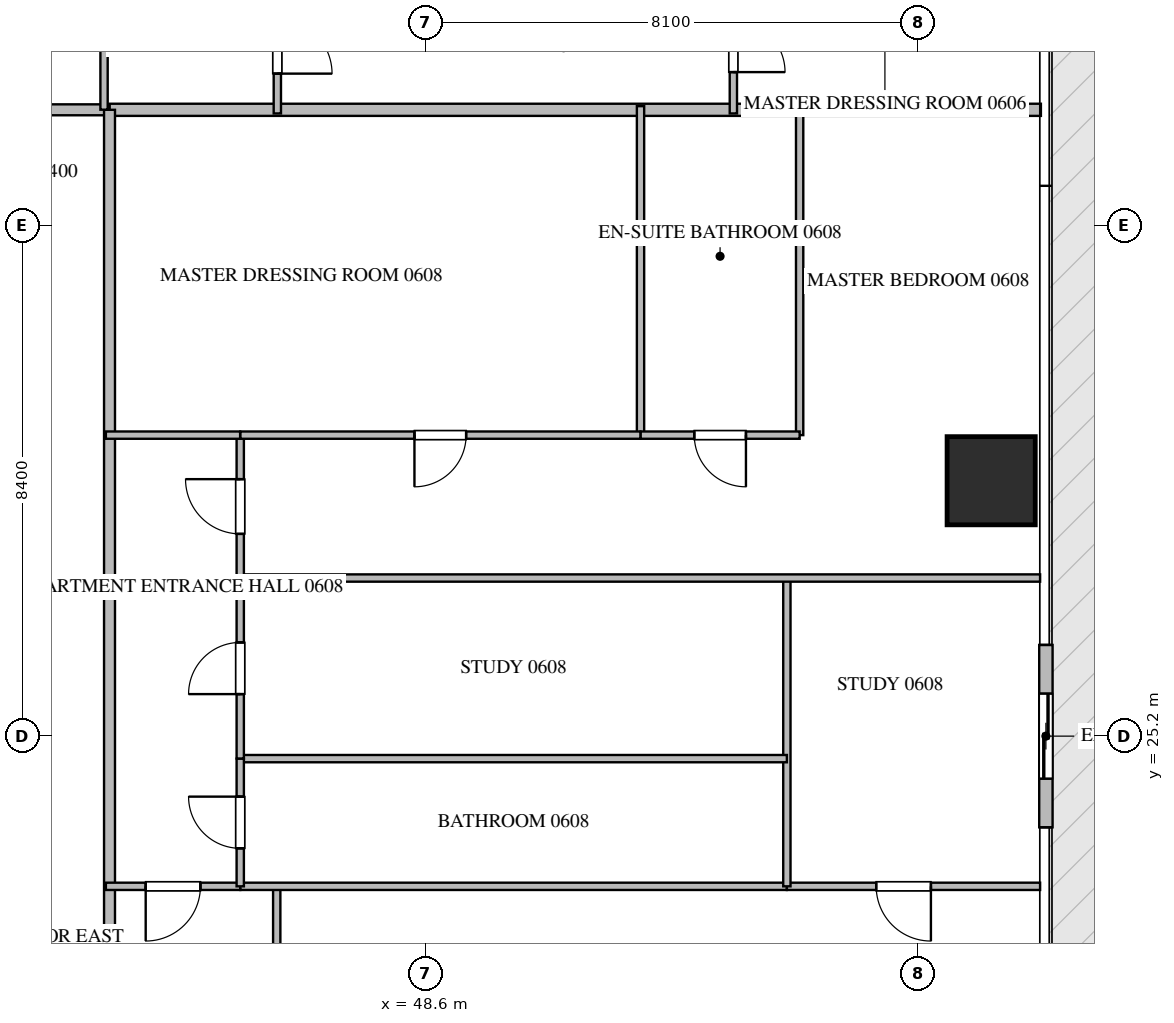
"""IFC4 building model, lengths in metres.
Left out: names, types, materials, properties, quantities, classifications, styles, units other than length and angle.
Written with IfcOpenShell. Run it as: python <this file> out.ifc"""

import sys

from ifc_helpers import new_model, si_unit, direction, frame, frame_2d, origin, origin_2d, place, context, subcontext, project, spatial, rectangle, extrude, source, transform, mapped, element, fill, save


model = new_model("IFC4")
c1 = context("Model", 3, precision=1e-05, world=origin(), true_north=direction((0.0, 1.0)))
c2 = subcontext(c1, "Body", "Model", "MODEL_VIEW")
j1 = project(units=[si_unit("LENGTHUNIT", "METRE"), si_unit("PLANEANGLEUNIT", "RADIAN")], contexts=[c1])
p1 = place(None, origin())
s1 = spatial("IfcSite", under=j1, at=p1, CompositionType="ELEMENT")
p2 = place(p1, origin())
s2 = spatial("IfcBuilding", under=s1, at=p2, CompositionType="ELEMENT")
p3 = place(p2, frame((0.0, 0.0, 30.45)))
s3 = spatial("IfcBuildingStorey", under=s2, at=p3, CompositionType="ELEMENT", Elevation=30.45)
m1 = source(origin(), c2, "Body", "SweptSolid", [
    extrude(rectangle(XDim=1.45, YDim=1.45, at=origin_2d()), origin(), (0.0, 0.0, 1.0), 3.75),
])
p4 = place(p3, frame((57.9, 29.4, -0.26), z_axis=(0.0, 0.0, 1.0), x_axis=(1.0, 0.0, 0.0)))
e1 = element("IfcColumn", 1, at=p4, inside=s3, PredefinedType="COLUMN", context=c2, shape_type="MappedRepresentation", body=[
    mapped(m1, transform((0.0, 0.0, 0.0), scale=1.0)),
])
p5 = place(p3, frame((58.8, 23.7, 0.0), z_axis=(0.0, 0.0, 1.0), x_axis=(0.0, 1.0, 0.0)))
e2 = element("IfcWall", 2, at=p5, inside=s3, PredefinedType="ELEMENTEDWALL", context=c2, shape_type="SweptSolid", body=[
    extrude(rectangle(XDim=3.0, YDim=0.22, at=frame_2d((1.5, 0.0))), origin(), (0.0, 0.0, 1.0), 3.475),
])
p6 = place(p5, frame((0.8, 0.0, 0.0)))
e3 = element("IfcOpeningElement", 3, at=p6, cuts=e2, PredefinedType="OPENING", context=c2, shape_type="SweptSolid", body=[
    extrude(rectangle(XDim=1.4, YDim=2.25, at=frame_2d((0.7, 1.125))), frame((0.0, 0.12, 0.0), z_axis=(0.0, -1.0, 0.0), x_axis=(1.0, 0.0, 0.0)), (0.0, 0.0, 1.0), 0.24),
])
p7 = place(p3, frame((43.4, 35.5, 0.0), z_axis=(0.0, 0.0, 1.0), x_axis=(1.0, 0.0, 0.0)))
e4 = element("IfcWall", 4, at=p7, inside=s3, PredefinedType="PARTITIONING", context=c2, shape_type="SweptSolid", body=[
    extrude(rectangle(XDim=15.318, YDim=0.2, at=frame_2d((7.659, 0.0))), origin(), (0.0, 0.0, 1.0), 3.49),
])
p8 = place(p3, frame((21.402, 35.5, 0.0), z_axis=(0.0, 0.0, 1.0), x_axis=(1.0, 0.0, 0.0)))
e5 = element("IfcWall", 5, at=p8, inside=s3, PredefinedType="PARTITIONING", context=c2, shape_type="SweptSolid", body=[
    extrude(rectangle(XDim=21.996, YDim=0.18, at=frame_2d((10.998, 0.0))), origin(), (0.0, 0.0, 1.0), 3.49),
])
p9 = place(p8, frame((2.1, 0.0, 0.0)))
e6 = element("IfcOpeningElement", 6, at=p9, cuts=e5, PredefinedType="OPENING", context=c2, shape_type="SweptSolid", body=[
    extrude(rectangle(XDim=1.0, YDim=2.15, at=frame_2d((0.5, 1.075))), frame((0.0, 0.1, 0.0), z_axis=(0.0, -1.0, 0.0), x_axis=(1.0, 0.0, 0.0)), (0.0, 0.0, 1.0), 0.2),
])
p10 = place(p8, frame((14.277, 0.0, 0.0)))
e7 = element("IfcOpeningElement", 7, at=p10, cuts=e5, PredefinedType="OPENING", context=c2, shape_type="SweptSolid", body=[
    extrude(rectangle(XDim=1.0, YDim=2.15, at=frame_2d((0.5, 1.075))), frame((0.0, 0.1, 0.0), z_axis=(0.0, -1.0, 0.0), x_axis=(1.0, 0.0, 0.0)), (0.0, 0.0, 1.0), 0.2),
])
p11 = place(p8, frame((18.896, 0.0, 0.0)))
e8 = element("IfcOpeningElement", 8, at=p11, cuts=e5, PredefinedType="OPENING", context=c2, shape_type="SweptSolid", body=[
    extrude(rectangle(XDim=1.0, YDim=2.15, at=frame_2d((0.5, 1.075))), frame((0.0, 0.1, 0.0), z_axis=(0.0, -1.0, 0.0), x_axis=(1.0, 0.0, 0.0)), (0.0, 0.0, 1.0), 0.2),
])
p12 = place(p3, frame((43.4, 14.9, 0.0), z_axis=(0.0, 0.0, 1.0), x_axis=(0.0, 1.0, 0.0)))
e9 = element("IfcWall", 9, at=p12, inside=s3, PredefinedType="PARTITIONING", context=c2, shape_type="SweptSolid", body=[
    extrude(rectangle(XDim=20.6, YDim=0.18, at=frame_2d((10.3, 0.0))), origin(), (0.0, 0.0, 1.0), 3.49),
])
p13 = place(p12, frame((1.96, 0.0, 0.0)))
e10 = element("IfcOpeningElement", 10, at=p13, cuts=e9, PredefinedType="OPENING", context=c2, shape_type="SweptSolid", body=[
    extrude(rectangle(XDim=1.0, YDim=2.15, at=frame_2d((0.5, 1.075))), frame((0.0, 0.1, 0.0), z_axis=(0.0, -1.0, 0.0), x_axis=(1.0, 0.0, 0.0)), (0.0, 0.0, 1.0), 0.2),
])
p14 = place(p3, frame((43.31, 38.25, 0.0), z_axis=(0.0, 0.0, 1.0), x_axis=(0.0, -1.0, 0.0)))
e11 = element("IfcWall", 11, at=p14, inside=s3, PredefinedType="PARTITIONING", context=c2, shape_type="SweptSolid", body=[
    extrude(rectangle(XDim=2.748, YDim=0.12, at=frame_2d((1.374, 0.0))), origin(), (0.0, 0.0, 1.0), 3.49),
])
p15 = place(p3, frame((46.16, 37.65, 0.0), z_axis=(0.0, 0.0, 1.0), x_axis=(0.0, -1.0, 0.0)))
e12 = element("IfcWall", 12, at=p15, inside=s3, PredefinedType="PARTITIONING", context=c2, shape_type="SweptSolid", body=[
    extrude(rectangle(XDim=2.21, YDim=0.12, at=frame_2d((1.105, 0.0))), origin(), (0.0, 0.0, 1.0), 3.49),
])
p16 = place(p15, frame((0.655, 0.0, 0.0)))
e13 = element("IfcOpeningElement", 13, at=p16, cuts=e12, PredefinedType="OPENING", context=c2, shape_type="SweptSolid", body=[
    extrude(rectangle(XDim=0.9, YDim=2.1, at=frame_2d((0.45, 1.05))), frame((0.0, 0.07, 0.0), z_axis=(0.0, -1.0, 0.0), x_axis=(1.0, 0.0, 0.0)), (0.0, 0.0, 1.0), 0.14),
])
p17 = place(p3, frame((53.66, 37.65, 0.0), z_axis=(0.0, 0.0, 1.0), x_axis=(0.0, -1.0, 0.0)))
e14 = element("IfcWall", 14, at=p17, inside=s3, PredefinedType="PARTITIONING", context=c2, shape_type="SweptSolid", body=[
    extrude(rectangle(XDim=2.21, YDim=0.12, at=frame_2d((1.105, 0.0))), origin(), (0.0, 0.0, 1.0), 3.49),
])
p18 = place(p17, frame((0.68, 0.0, 0.0)))
e15 = element("IfcOpeningElement", 15, at=p18, cuts=e14, PredefinedType="OPENING", context=c2, shape_type="SweptSolid", body=[
    extrude(rectangle(XDim=0.85, YDim=2.1, at=frame_2d((0.425, 1.05))), frame((0.0, 0.07, 0.0), z_axis=(0.0, -1.0, 0.0), x_axis=(1.0, 0.0, 0.0)), (0.0, 0.0, 1.0), 0.14),
])
p19 = place(p3, frame((46.15, 19.4, 0.0), z_axis=(0.0, 0.0, 1.0), x_axis=(0.0, 1.0, 0.0)))
e16 = element("IfcWall", 16, at=p19, inside=s3, PredefinedType="PARTITIONING", context=c2, shape_type="SweptSolid", body=[
    extrude(rectangle(XDim=3.33, YDim=0.12, at=frame_2d((1.665, 0.0))), origin(), (0.0, 0.0, 1.0), 3.49),
])
p20 = place(p19, frame((1.24, 0.0, 0.0)))
e17 = element("IfcOpeningElement", 17, at=p20, cuts=e16, PredefinedType="OPENING", context=c2, shape_type="SweptSolid", body=[
    extrude(rectangle(XDim=0.85, YDim=2.1, at=frame_2d((0.425, 1.05))), frame((0.0, 0.07, 0.0), z_axis=(0.0, -1.0, 0.0), x_axis=(1.0, 0.0, 0.0)), (0.0, 0.0, 1.0), 0.14),
])
p21 = place(p3, frame((45.55, 22.73, 0.0), z_axis=(0.0, 0.0, 1.0), x_axis=(-1.0, 0.0, 0.0)))
e18 = element("IfcWall", 18, at=p21, inside=s3, PredefinedType="PARTITIONING", context=c2, shape_type="SweptSolid", body=[
    extrude(rectangle(XDim=2.21, YDim=0.12, at=frame_2d((1.105, 0.0))), origin(), (0.0, 0.0, 1.0), 3.49),
])
p22 = place(p21, frame((0.655, 0.0, 0.0)))
e19 = element("IfcOpeningElement", 19, at=p22, cuts=e18, PredefinedType="OPENING", context=c2, shape_type="SweptSolid", body=[
    extrude(rectangle(XDim=0.9, YDim=2.1, at=frame_2d((0.45, 1.05))), frame((0.0, 0.07, 0.0), z_axis=(0.0, -1.0, 0.0), x_axis=(1.0, 0.0, 0.0)), (0.0, 0.0, 1.0), 0.14),
])
p23 = place(p3, frame((58.705, 22.73, 0.0), z_axis=(0.0, 0.0, 1.0), x_axis=(-1.0, 0.0, 0.0)))
e20 = element("IfcWall", 20, at=p23, inside=s3, PredefinedType="PARTITIONING", context=c2, shape_type="SweptSolid", body=[
    extrude(rectangle(XDim=4.165, YDim=0.12, at=frame_2d((2.083, 0.0))), origin(), (0.0, 0.0, 1.0), 3.49),
])
p24 = place(p23, frame((1.796, 0.0, 0.0)))
e21 = element("IfcOpeningElement", 21, at=p24, cuts=e20, PredefinedType="OPENING", context=c2, shape_type="SweptSolid", body=[
    extrude(rectangle(XDim=0.9, YDim=2.1, at=frame_2d((0.45, 1.05))), frame((0.0, 0.07, 0.0), z_axis=(0.0, -1.0, 0.0), x_axis=(1.0, 0.0, 0.0)), (0.0, 0.0, 1.0), 0.14),
])
p25 = place(p3, frame((54.538, 22.73, 0.0), z_axis=(0.0, 0.0, 1.0), x_axis=(-1.0, 0.0, 0.0)))
e22 = element("IfcWall", 22, at=p25, inside=s3, PredefinedType="PARTITIONING", context=c2, shape_type="SweptSolid", body=[
    extrude(rectangle(XDim=8.986, YDim=0.12, at=frame_2d((4.493, 0.0))), origin(), (0.0, 0.0, 1.0), 3.49),
])
p26 = place(p3, frame((54.54, 22.73, 0.0), z_axis=(0.0, 0.0, 1.0), x_axis=(0.0, 1.0, 0.0)))
e23 = element("IfcWall", 23, at=p26, inside=s3, PredefinedType="PARTITIONING", context=c2, shape_type="SweptSolid", body=[
    extrude(rectangle(XDim=5.07, YDim=0.12, at=frame_2d((2.535, 0.0))), origin(), (0.0, 0.0, 1.0), 3.49),
])
p27 = place(p3, frame((58.705, 27.8, 0.0), z_axis=(0.0, 0.0, 1.0), x_axis=(-1.0, 0.0, 0.0)))
e24 = element("IfcWall", 24, at=p27, inside=s3, PredefinedType="PARTITIONING", context=c2, shape_type="SweptSolid", body=[
    extrude(rectangle(XDim=13.155, YDim=0.12, at=frame_2d((6.578, 0.0))), origin(), (0.0, 0.0, 1.0), 3.49),
])
p28 = place(p3, frame((54.54, 24.83, 0.0), z_axis=(0.0, 0.0, 1.0), x_axis=(-1.0, 0.0, 0.0)))
e25 = element("IfcWall", 25, at=p28, inside=s3, PredefinedType="PARTITIONING", context=c2, shape_type="SweptSolid", body=[
    extrude(rectangle(XDim=8.99, YDim=0.12, at=frame_2d((4.495, 0.0))), origin(), (0.0, 0.0, 1.0), 3.49),
])
p29 = place(p3, frame((45.55, 22.73, 0.0), z_axis=(0.0, 0.0, 1.0), x_axis=(0.0, 1.0, 0.0)))
e26 = element("IfcWall", 26, at=p29, inside=s3, PredefinedType="PARTITIONING", context=c2, shape_type="SweptSolid", body=[
    extrude(rectangle(XDim=2.1, YDim=0.12, at=frame_2d((1.05, 0.0))), origin(), (0.0, 0.0, 1.0), 3.49),
])
p30 = place(p29, frame((0.625, 0.0, 0.0)))
e27 = element("IfcOpeningElement", 27, at=p30, cuts=e26, PredefinedType="OPENING", context=c2, shape_type="SweptSolid", body=[
    extrude(rectangle(XDim=0.85, YDim=2.1, at=frame_2d((0.425, 1.05))), frame((0.0, 0.07, 0.0), z_axis=(0.0, -1.0, 0.0), x_axis=(1.0, 0.0, 0.0)), (0.0, 0.0, 1.0), 0.14),
])
p31 = place(p3, frame((45.55, 24.832, 0.0), z_axis=(0.0, 0.0, 1.0), x_axis=(0.0, 1.0, 0.0)))
e28 = element("IfcWall", 28, at=p31, inside=s3, PredefinedType="PARTITIONING", context=c2, shape_type="SweptSolid", body=[
    extrude(rectangle(XDim=2.968, YDim=0.12, at=frame_2d((1.484, 0.0))), origin(), (0.0, 0.0, 1.0), 3.49),
])
p32 = place(p31, frame((1.059, 0.0, 0.0)))
e29 = element("IfcOpeningElement", 29, at=p32, cuts=e28, PredefinedType="OPENING", context=c2, shape_type="SweptSolid", body=[
    extrude(rectangle(XDim=0.85, YDim=2.1, at=frame_2d((0.425, 1.05))), frame((0.0, 0.07, 0.0), z_axis=(0.0, -1.0, 0.0), x_axis=(1.0, 0.0, 0.0)), (0.0, 0.0, 1.0), 0.14),
])
p33 = place(p3, frame((45.55, 27.802, 0.0), z_axis=(0.0, 0.0, 1.0), x_axis=(0.0, 1.0, 0.0)))
e30 = element("IfcWall", 30, at=p33, inside=s3, PredefinedType="PARTITIONING", context=c2, shape_type="SweptSolid", body=[
    extrude(rectangle(XDim=2.348, YDim=0.12, at=frame_2d((1.174, 0.0))), origin(), (0.0, 0.0, 1.0), 3.49),
])
p34 = place(p33, frame((0.724, 0.0, 0.0)))
e31 = element("IfcOpeningElement", 31, at=p34, cuts=e30, PredefinedType="OPENING", context=c2, shape_type="SweptSolid", body=[
    extrude(rectangle(XDim=0.9, YDim=2.1, at=frame_2d((0.45, 1.05))), frame((0.0, 0.07, 0.0), z_axis=(0.0, -1.0, 0.0), x_axis=(1.0, 0.0, 0.0)), (0.0, 0.0, 1.0), 0.14),
])
for number, where, z_axis, x_axis in (
    (32, (54.75, 30.15, 0.0), (0.0, 0.0, 1.0), (0.0, 1.0, 0.0)),
    (33, (52.133, 30.15, 0.0), (0.0, 0.0, 1.0), (0.0, 1.0, 0.0)),
):
    element("IfcWall", number, at=place(p3, frame(where, z_axis=z_axis, x_axis=x_axis)), inside=s3, PredefinedType="PARTITIONING", context=c2, shape_type="SweptSolid", body=[
        extrude(rectangle(XDim=5.41, YDim=0.12, at=frame_2d((2.705, 0.0))), origin(), (0.0, 0.0, 1.0), 3.49),
    ])
p35 = place(p3, frame((54.75, 30.15, 0.0), z_axis=(0.0, 0.0, 1.0), x_axis=(-1.0, 0.0, 0.0)))
e34 = element("IfcWall", 34, at=p35, inside=s3, PredefinedType="PARTITIONING", context=c2, shape_type="SweptSolid", body=[
    extrude(rectangle(XDim=2.617, YDim=0.12, at=frame_2d((1.309, 0.0))), origin(), (0.0, 0.0, 1.0), 3.49),
])
p36 = place(p35, frame((0.883, 0.0, 0.0)))
e35 = element("IfcOpeningElement", 35, at=p36, cuts=e34, PredefinedType="OPENING", context=c2, shape_type="SweptSolid", body=[
    extrude(rectangle(XDim=0.85, YDim=2.1, at=frame_2d((0.425, 1.05))), frame((0.0, 0.07, 0.0), z_axis=(0.0, -1.0, 0.0), x_axis=(1.0, 0.0, 0.0)), (0.0, 0.0, 1.0), 0.14),
])
p37 = place(p3, frame((52.131, 30.15, 0.0), z_axis=(0.0, 0.0, 1.0), x_axis=(-1.0, 0.0, 0.0)))
e36 = element("IfcWall", 36, at=p37, inside=s3, PredefinedType="PARTITIONING", context=c2, shape_type="SweptSolid", body=[
    extrude(rectangle(XDim=6.581, YDim=0.12, at=frame_2d((3.291, 0.0))), origin(), (0.0, 0.0, 1.0), 3.49),
])
p38 = place(p37, frame((2.866, 0.0, 0.0)))
e37 = element("IfcOpeningElement", 37, at=p38, cuts=e36, PredefinedType="OPENING", context=c2, shape_type="SweptSolid", body=[
    extrude(rectangle(XDim=0.85, YDim=2.1, at=frame_2d((0.425, 1.05))), frame((0.0, 0.07, 0.0), z_axis=(0.0, -1.0, 0.0), x_axis=(1.0, 0.0, 0.0)), (0.0, 0.0, 1.0), 0.14),
])
p39 = place(p3, frame((45.548, 30.15, 0.0), z_axis=(0.0, 0.0, 1.0), x_axis=(-1.0, 0.0, 0.0)))
e38 = element("IfcWall", 38, at=p39, inside=s3, PredefinedType="PARTITIONING", context=c2, shape_type="SweptSolid", body=[
    extrude(rectangle(XDim=2.208, YDim=0.12, at=frame_2d((1.104, 0.0))), origin(), (0.0, 0.0, 1.0), 3.49),
])
m2 = source(origin(), c2, "Body", "SweptSolid", [
    extrude(rectangle(XDim=1.4, YDim=2.25, at=frame_2d((0.7, 1.125))), frame((0.0, 0.025, 0.0), z_axis=(0.0, -1.0, 0.0), x_axis=(1.0, 0.0, 0.0)), (0.0, 0.0, 1.0), 0.05),
])
p40 = place(p6, origin())
e39 = element("IfcDoor", 39, at=p40, inside=s3, OperationType="SLIDING_TO_LEFT", PredefinedType="DOOR", context=c2, shape_type="MappedRepresentation", body=[
    mapped(m2, transform((0.0, 0.0, 0.0), scale=1.0)),
])
fill(e3, e39)
m3 = source(origin(), c2, "Body", "SweptSolid", [
    extrude(rectangle(XDim=0.9, YDim=2.1, at=frame_2d((0.45, 1.05))), frame((0.0, 0.025, 0.0), z_axis=(0.0, -1.0, 0.0), x_axis=(1.0, 0.0, 0.0)), (0.0, 0.0, 1.0), 0.05),
])
p41 = place(p16, origin())
e40 = element("IfcDoor", 40, at=p41, inside=s3, OperationType="SINGLE_SWING_RIGHT", PredefinedType="DOOR", context=c2, shape_type="MappedRepresentation", body=[
    mapped(m3, transform((0.0, 0.0, 0.0), scale=1.0)),
])
fill(e13, e40)
m4 = source(origin(), c2, "Body", "SweptSolid", [
    extrude(rectangle(XDim=0.85, YDim=2.1, at=frame_2d((0.425, 1.05))), frame((0.0, 0.025, 0.0), z_axis=(0.0, -1.0, 0.0), x_axis=(1.0, 0.0, 0.0)), (0.0, 0.0, 1.0), 0.05),
])
p42 = place(p18, origin())
e41 = element("IfcDoor", 41, at=p42, inside=s3, OperationType="SINGLE_SWING_RIGHT", PredefinedType="DOOR", context=c2, shape_type="MappedRepresentation", body=[
    mapped(m4, transform((0.0, 0.0, 0.0), scale=1.0)),
])
fill(e15, e41)
p43 = place(p22, origin())
e42 = element("IfcDoor", 42, at=p43, inside=s3, OperationType="SINGLE_SWING_RIGHT", PredefinedType="DOOR", context=c2, shape_type="MappedRepresentation", body=[
    mapped(m3, transform((0.0, 0.0, 0.0), scale=1.0)),
])
fill(e19, e42)
p44 = place(p24, origin())
e43 = element("IfcDoor", 43, at=p44, inside=s3, OperationType="SINGLE_SWING_LEFT", PredefinedType="DOOR", context=c2, shape_type="MappedRepresentation", body=[
    mapped(m3, transform((0.0, 0.0, 0.0), scale=1.0)),
])
fill(e21, e43)
p45 = place(p30, origin())
e44 = element("IfcDoor", 44, at=p45, inside=s3, OperationType="SINGLE_SWING_RIGHT", PredefinedType="DOOR", context=c2, shape_type="MappedRepresentation", body=[
    mapped(m4, transform((0.0, 0.0, 0.0), scale=1.0)),
])
fill(e27, e44)
p46 = place(p32, origin())
e45 = element("IfcDoor", 45, at=p46, inside=s3, OperationType="SINGLE_SWING_LEFT", PredefinedType="DOOR", context=c2, shape_type="MappedRepresentation", body=[
    mapped(m4, transform((0.0, 0.0, 0.0), scale=1.0)),
])
fill(e29, e45)
p47 = place(p34, origin())
e46 = element("IfcDoor", 46, at=p47, inside=s3, OperationType="SINGLE_SWING_RIGHT", PredefinedType="DOOR", context=c2, shape_type="MappedRepresentation", body=[
    mapped(m3, transform((0.0, 0.0, 0.0), scale=1.0)),
])
fill(e31, e46)
p48 = place(p36, origin())
e47 = element("IfcDoor", 47, at=p48, inside=s3, OperationType="SINGLE_SWING_LEFT", PredefinedType="DOOR", context=c2, shape_type="MappedRepresentation", body=[
    mapped(m4, transform((0.0, 0.0, 0.0), scale=1.0)),
])
fill(e35, e47)
p49 = place(p38, origin())
e48 = element("IfcDoor", 48, at=p49, inside=s3, OperationType="SINGLE_SWING_RIGHT", PredefinedType="DOOR", context=c2, shape_type="MappedRepresentation", body=[
    mapped(m4, transform((0.0, 0.0, 0.0), scale=1.0)),
])
fill(e37, e48)
save(model, sys.argv[1])
